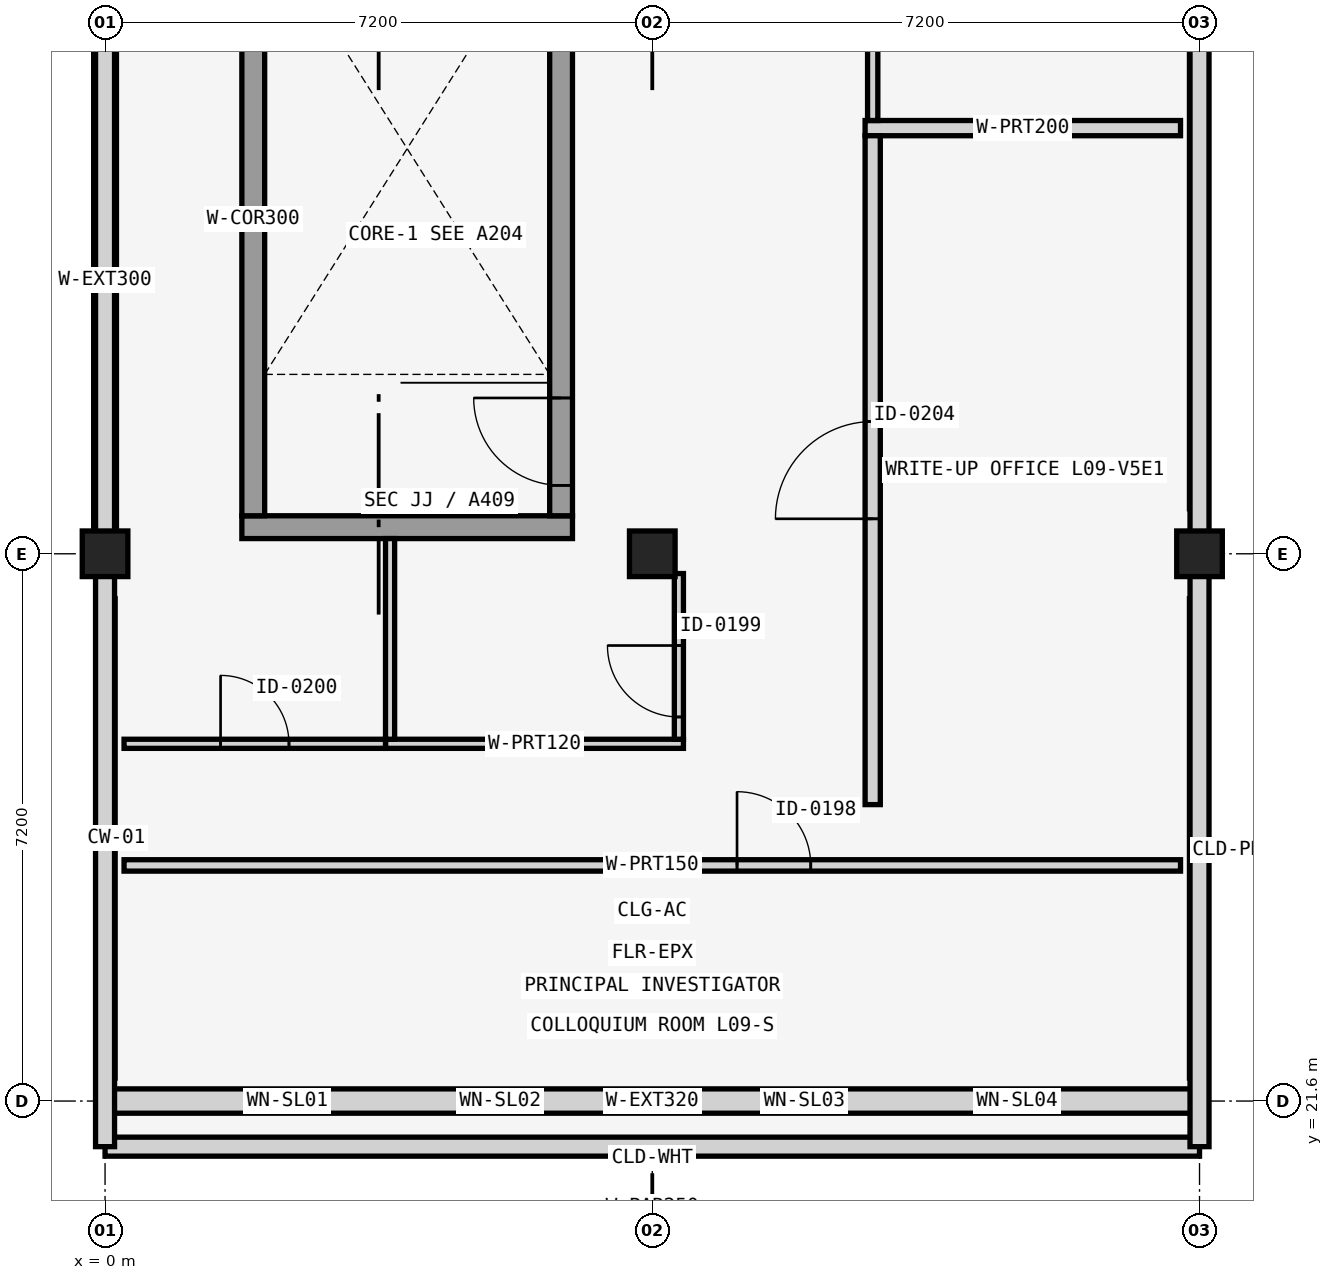
"""IFC4 building model, lengths in metres.
Left out: names, types, materials, properties, quantities, classifications, styles, units other than length and angle.
Written with IfcOpenShell. Run it as: python <this file> out.ifc"""

import sys

from ifc_helpers import new_model, si_unit, direction, frame, frame_2d, origin, origin_2d, place, context, subcontext, project, spatial, rectangle, extrude, element, fill, save


model = new_model("IFC4")
c1 = context("Model", 3, precision=1e-05, world=origin(), true_north=direction((0.0, 1.0)))
c2 = subcontext(c1, "Body", "Model", "MODEL_VIEW")
j1 = project(units=[si_unit("LENGTHUNIT", "METRE"), si_unit("PLANEANGLEUNIT", "RADIAN")], contexts=[c1])
p1 = place(None, origin())
s1 = spatial("IfcSite", under=j1, at=p1, CompositionType="ELEMENT")
p2 = place(p1, origin())
s2 = spatial("IfcBuilding", under=s1, at=p2, CompositionType="ELEMENT")
p3 = place(p2, frame((0.0, 0.0, 38.08)))
s3 = spatial("IfcBuildingStorey", under=s2, at=p3, CompositionType="ELEMENT", Elevation=38.08)
for number, where, z_axis, x_axis in (
    (1, (0.0, 28.8, 0.0), (0.0, 0.0, 1.0), (1.0, 0.0, 0.0)),
    (2, (7.2, 28.8, 0.0), (0.0, 0.0, 1.0), (1.0, 0.0, 0.0)),
    (3, (14.4, 28.8, 0.0), (0.0, 0.0, 1.0), (1.0, 0.0, 0.0)),
):
    element("IfcColumn", number, at=place(p3, frame(where, z_axis=z_axis, x_axis=x_axis)), inside=s3, PredefinedType="COLUMN", context=c2, shape_type="SweptSolid", body=[
        extrude(rectangle(XDim=0.6, YDim=0.6, at=origin_2d()), origin(), (0.0, 0.0, 1.0), 4.16),
    ])
p4 = place(p3, frame((0.0, 21.6, 0.0), z_axis=(0.0, 0.0, 1.0), x_axis=(1.0, 0.0, 0.0)))
e4 = element("IfcWall", 4, at=p4, inside=s3, PredefinedType="SOLIDWALL", context=c2, shape_type="SweptSolid", body=[
    extrude(rectangle(XDim=14.4, YDim=0.32, at=frame_2d((7.2, 0.0))), origin(), (0.0, 0.0, 1.0), 3.28),
])
p5 = place(p4, frame((2.175, 0.0, 0.72)))
e5 = element("IfcOpeningElement", 5, at=p5, cuts=e4, PredefinedType="OPENING", context=c2, shape_type="SweptSolid", body=[
    extrude(rectangle(XDim=0.45, YDim=2.4, at=frame_2d((0.225, 1.2))), frame((0.0, 0.17, 0.0), z_axis=(0.0, -1.0, 0.0), x_axis=(1.0, 0.0, 0.0)), (0.0, 0.0, 1.0), 0.34),
])
p6 = place(p4, frame((4.95, 0.0, 0.72)))
e6 = element("IfcOpeningElement", 6, at=p6, cuts=e4, PredefinedType="OPENING", context=c2, shape_type="SweptSolid", body=[
    extrude(rectangle(XDim=0.5, YDim=2.4, at=frame_2d((0.25, 1.2))), frame((0.0, 0.17, 0.0), z_axis=(0.0, -1.0, 0.0), x_axis=(1.0, 0.0, 0.0)), (0.0, 0.0, 1.0), 0.34),
])
p7 = place(p4, frame((8.925, 0.0, 0.85)))
e7 = element("IfcOpeningElement", 7, at=p7, cuts=e4, PredefinedType="OPENING", context=c2, shape_type="SweptSolid", body=[
    extrude(rectangle(XDim=0.55, YDim=2.2, at=frame_2d((0.275, 1.1))), frame((0.0, 0.17, 0.0), z_axis=(0.0, -1.0, 0.0), x_axis=(1.0, 0.0, 0.0)), (0.0, 0.0, 1.0), 0.34),
])
p8 = place(p4, frame((11.775, 0.0, 0.85)))
e8 = element("IfcOpeningElement", 8, at=p8, cuts=e4, PredefinedType="OPENING", context=c2, shape_type="SweptSolid", body=[
    extrude(rectangle(XDim=0.45, YDim=2.1, at=frame_2d((0.225, 1.05))), frame((0.0, 0.17, 0.0), z_axis=(0.0, -1.0, 0.0), x_axis=(1.0, 0.0, 0.0)), (0.0, 0.0, 1.0), 0.34),
])
p9 = place(p3, frame((0.0, 29.09, 0.0), z_axis=(0.0, 0.0, 1.0), x_axis=(0.0, 1.0, 0.0)))
e9 = element("IfcWall", 9, at=p9, inside=s3, PredefinedType="SOLIDWALL", context=c2, shape_type="SweptSolid", body=[
    extrude(rectangle(XDim=6.62, YDim=0.3, at=frame_2d((3.31, 0.0))), origin(), (0.0, 0.0, 1.0), 3.28),
])
p10 = place(p3, frame((0.0, 21.0, 4.16), z_axis=(0.0, 0.0, 1.0), x_axis=(1.0, 0.0, 0.0)))
e10 = element("IfcWall", 10, at=p10, inside=s3, PredefinedType="PARAPET", context=c2, shape_type="SweptSolid", body=[
    extrude(rectangle(XDim=14.4, YDim=0.25, at=frame_2d((7.2, 0.0))), origin(), (0.0, 0.0, 1.0), 0.9),
])
for number, where, z_axis, x_axis in (
    (11, (0.0, 21.0, 4.16), (0.0, 0.0, 1.0), (0.0, 1.0, 0.0)),
    (12, (14.4, 21.0, 4.16), (0.0, 0.0, 1.0), (0.0, 1.0, 0.0)),
):
    element("IfcWall", number, at=place(p3, frame(where, z_axis=z_axis, x_axis=x_axis)), inside=s3, PredefinedType="PARAPET", context=c2, shape_type="SweptSolid", body=[
        extrude(rectangle(XDim=65.4, YDim=0.25, at=frame_2d((32.7, 0.0))), origin(), (0.0, 0.0, 1.0), 0.9),
    ])
p11 = place(p3, frame((1.8, 29.15, 0.0), z_axis=(0.0, 0.0, 1.0), x_axis=(1.0, 0.0, 0.0)))
e13 = element("IfcWall", 13, at=p11, inside=s3, PredefinedType="SHEAR", context=c2, shape_type="SweptSolid", body=[
    extrude(rectangle(XDim=4.35, YDim=0.3, at=frame_2d((2.175, 0.0))), origin(), (0.0, 0.0, 1.0), 3.88),
])
p12 = place(p3, frame((1.95, 29.3, 0.0), z_axis=(0.0, 0.0, 1.0), x_axis=(0.0, 1.0, 0.0)))
e14 = element("IfcWall", 14, at=p12, inside=s3, PredefinedType="SHEAR", context=c2, shape_type="SweptSolid", body=[
    extrude(rectangle(XDim=7.8, YDim=0.3, at=frame_2d((3.9, 0.0))), origin(), (0.0, 0.0, 1.0), 3.88),
])
p13 = place(p3, frame((6.0, 29.3, 0.0), z_axis=(0.0, 0.0, 1.0), x_axis=(0.0, 1.0, 0.0)))
e15 = element("IfcWall", 15, at=p13, inside=s3, PredefinedType="SHEAR", context=c2, shape_type="SweptSolid", body=[
    extrude(rectangle(XDim=7.8, YDim=0.3, at=frame_2d((3.9, 0.0))), origin(), (0.0, 0.0, 1.0), 3.88),
])
p14 = place(p13, frame((0.4, 0.0, 0.0)))
e16 = element("IfcOpeningElement", 16, at=p14, cuts=e15, PredefinedType="OPENING", context=c2, shape_type="SweptSolid", body=[
    extrude(rectangle(XDim=1.15, YDim=2.2, at=frame_2d((0.575, 1.1))), frame((0.0, 0.16, 0.0), z_axis=(0.0, -1.0, 0.0), x_axis=(1.0, 0.0, 0.0)), (0.0, 0.0, 1.0), 0.32),
])
p15 = place(p3, frame((0.25, 24.7, 0.0), z_axis=(0.0, 0.0, 1.0), x_axis=(1.0, 0.0, 0.0)))
e17 = element("IfcWall", 17, at=p15, inside=s3, PredefinedType="PARTITIONING", context=c2, shape_type="SweptSolid", body=[
    extrude(rectangle(XDim=13.9, YDim=0.15, at=frame_2d((6.95, 0.0))), origin(), (0.0, 0.0, 1.0), 3.28),
])
p16 = place(p15, frame((8.065, 0.0, 0.0)))
e18 = element("IfcOpeningElement", 18, at=p16, cuts=e17, PredefinedType="OPENING", context=c2, shape_type="SweptSolid", body=[
    extrude(rectangle(XDim=0.97, YDim=2.08, at=frame_2d((0.485, 1.04))), frame((0.0, 0.085, 0.0), z_axis=(0.0, -1.0, 0.0), x_axis=(1.0, 0.0, 0.0)), (0.0, 0.0, 1.0), 0.17),
])
p17 = place(p3, frame((3.69, 26.3, 0.0), z_axis=(0.0, 0.0, 1.0), x_axis=(1.0, 0.0, 0.0)))
e19 = element("IfcWall", 19, at=p17, inside=s3, PredefinedType="PARTITIONING", context=c2, shape_type="SweptSolid", body=[
    extrude(rectangle(XDim=3.92, YDim=0.12, at=frame_2d((1.96, 0.0))), origin(), (0.0, 0.0, 1.0), 3.28),
])
p18 = place(p3, frame((3.75, 26.36, 0.0), z_axis=(0.0, 0.0, 1.0), x_axis=(0.0, 1.0, 0.0)))
e20 = element("IfcWall", 20, at=p18, inside=s3, PredefinedType="PARTITIONING", context=c2, shape_type="SweptSolid", body=[
    extrude(rectangle(XDim=2.64, YDim=0.12, at=frame_2d((1.32, 0.0))), origin(), (0.0, 0.0, 1.0), 3.88),
])
p19 = place(p3, frame((7.55, 26.36, 0.0), z_axis=(0.0, 0.0, 1.0), x_axis=(0.0, 1.0, 0.0)))
e21 = element("IfcWall", 21, at=p19, inside=s3, PredefinedType="PARTITIONING", context=c2, shape_type="SweptSolid", body=[
    extrude(rectangle(XDim=2.18, YDim=0.12, at=frame_2d((1.09, 0.0))), origin(), (0.0, 0.0, 1.0), 3.88),
])
p20 = place(p19, frame((0.293, 0.0, 0.0)))
e22 = element("IfcOpeningElement", 22, at=p20, cuts=e21, PredefinedType="OPENING", context=c2, shape_type="SweptSolid", body=[
    extrude(rectangle(XDim=0.94, YDim=2.1, at=frame_2d((0.47, 1.05))), frame((0.0, 0.07, 0.0), z_axis=(0.0, -1.0, 0.0), x_axis=(1.0, 0.0, 0.0)), (0.0, 0.0, 1.0), 0.14),
])
p21 = place(p3, frame((0.25, 26.3, 0.0), z_axis=(0.0, 0.0, 1.0), x_axis=(1.0, 0.0, 0.0)))
e23 = element("IfcWall", 23, at=p21, inside=s3, PredefinedType="PARTITIONING", context=c2, shape_type="SweptSolid", body=[
    extrude(rectangle(XDim=3.44, YDim=0.12, at=frame_2d((1.72, 0.0))), origin(), (0.0, 0.0, 1.0), 3.88),
])
p22 = place(p21, frame((1.27, 0.0, 0.0)))
e24 = element("IfcOpeningElement", 24, at=p22, cuts=e23, PredefinedType="OPENING", context=c2, shape_type="SweptSolid", body=[
    extrude(rectangle(XDim=0.9, YDim=2.1, at=frame_2d((0.45, 1.05))), frame((0.0, 0.07, 0.0), z_axis=(0.0, -1.0, 0.0), x_axis=(1.0, 0.0, 0.0)), (0.0, 0.0, 1.0), 0.14),
])
p23 = place(p3, frame((10.0, 34.4, 0.0), z_axis=(0.0, 0.0, 1.0), x_axis=(1.0, 0.0, 0.0)))
e25 = element("IfcWall", 25, at=p23, inside=s3, PredefinedType="PARTITIONING", context=c2, shape_type="SweptSolid", body=[
    extrude(rectangle(XDim=4.15, YDim=0.2, at=frame_2d((2.075, 0.0))), origin(), (0.0, 0.0, 1.0), 3.88),
])
p24 = place(p3, frame((10.1, 25.5, 0.0), z_axis=(0.0, 0.0, 1.0), x_axis=(0.0, 1.0, 0.0)))
e26 = element("IfcWall", 26, at=p24, inside=s3, PredefinedType="PARTITIONING", context=c2, shape_type="SweptSolid", body=[
    extrude(rectangle(XDim=8.8, YDim=0.2, at=frame_2d((4.4, 0.0))), origin(), (0.0, 0.0, 1.0), 3.88),
])
p25 = place(p24, frame((3.76, 0.0, 0.0)))
e27 = element("IfcOpeningElement", 27, at=p25, cuts=e26, PredefinedType="OPENING", context=c2, shape_type="SweptSolid", body=[
    extrude(rectangle(XDim=1.28, YDim=2.12, at=frame_2d((0.64, 1.06))), frame((0.0, 0.11, 0.0), z_axis=(0.0, -1.0, 0.0), x_axis=(1.0, 0.0, 0.0)), (0.0, 0.0, 1.0), 0.22),
])
p26 = place(p3, frame((10.1, 34.5, 0.0), z_axis=(0.0, 0.0, 1.0), x_axis=(0.0, 1.0, 0.0)))
e28 = element("IfcWall", 28, at=p26, inside=s3, PredefinedType="PARTITIONING", context=c2, shape_type="SweptSolid", body=[
    extrude(rectangle(XDim=14.232, YDim=0.135, at=frame_2d((7.116, 0.0))), origin(), (0.0, 0.0, 1.0), 3.88),
])
p27 = place(p26, frame((6.451, 0.0, 0.0)))
e29 = element("IfcOpeningElement", 29, at=p27, cuts=e28, PredefinedType="OPENING", context=c2, shape_type="SweptSolid", body=[
    extrude(rectangle(XDim=1.33, YDim=2.12, at=frame_2d((0.665, 1.06))), frame((0.0, 0.078, 0.0), z_axis=(0.0, -1.0, 0.0), x_axis=(1.0, 0.0, 0.0)), (0.0, 0.0, 1.0), 0.155),
])
p28 = place(p5, origin())
e30 = element("IfcWindow", 30, at=p28, inside=s3, PartitioningType="SINGLE_PANEL", PredefinedType="WINDOW", context=c2, shape_type="SweptSolid", body=[
    extrude(rectangle(XDim=0.45, YDim=2.4, at=frame_2d((0.225, 1.2))), frame((0.0, 0.03, 0.0), z_axis=(0.0, -1.0, 0.0), x_axis=(1.0, 0.0, 0.0)), (0.0, 0.0, 1.0), 0.06),
])
fill(e5, e30)
p29 = place(p6, origin())
e31 = element("IfcWindow", 31, at=p29, inside=s3, PartitioningType="SINGLE_PANEL", PredefinedType="WINDOW", context=c2, shape_type="SweptSolid", body=[
    extrude(rectangle(XDim=0.5, YDim=2.4, at=frame_2d((0.25, 1.2))), frame((0.0, 0.03, 0.0), z_axis=(0.0, -1.0, 0.0), x_axis=(1.0, 0.0, 0.0)), (0.0, 0.0, 1.0), 0.06),
])
fill(e6, e31)
p30 = place(p7, origin())
e32 = element("IfcWindow", 32, at=p30, inside=s3, PartitioningType="SINGLE_PANEL", PredefinedType="WINDOW", context=c2, shape_type="SweptSolid", body=[
    extrude(rectangle(XDim=0.55, YDim=2.2, at=frame_2d((0.275, 1.1))), frame((0.0, 0.03, 0.0), z_axis=(0.0, -1.0, 0.0), x_axis=(1.0, 0.0, 0.0)), (0.0, 0.0, 1.0), 0.06),
])
fill(e7, e32)
p31 = place(p8, origin())
e33 = element("IfcWindow", 33, at=p31, inside=s3, PartitioningType="SINGLE_PANEL", PredefinedType="WINDOW", context=c2, shape_type="SweptSolid", body=[
    extrude(rectangle(XDim=0.45, YDim=2.1, at=frame_2d((0.225, 1.05))), frame((0.0, 0.03, 0.0), z_axis=(0.0, -1.0, 0.0), x_axis=(1.0, 0.0, 0.0)), (0.0, 0.0, 1.0), 0.06),
])
fill(e8, e33)
p32 = place(p14, origin())
e34 = element("IfcDoor", 34, at=p32, inside=s3, OperationType="SINGLE_SWING_RIGHT", PredefinedType="DOOR", context=c2, shape_type="SweptSolid", body=[
    extrude(rectangle(XDim=1.15, YDim=2.2, at=frame_2d((0.575, 1.1))), frame((0.0, 0.025, 0.0), z_axis=(0.0, -1.0, 0.0), x_axis=(1.0, 0.0, 0.0)), (0.0, 0.0, 1.0), 0.05),
])
fill(e16, e34)
p33 = place(p16, origin())
e35 = element("IfcDoor", 35, at=p33, inside=s3, OperationType="SINGLE_SWING_LEFT", PredefinedType="DOOR", context=c2, shape_type="SweptSolid", body=[
    extrude(rectangle(XDim=0.97, YDim=2.08, at=frame_2d((0.485, 1.04))), frame((0.0, 0.025, 0.0), z_axis=(0.0, -1.0, 0.0), x_axis=(1.0, 0.0, 0.0)), (0.0, 0.0, 1.0), 0.05),
])
fill(e18, e35)
p34 = place(p20, frame((0.94, 0.0, 0.0), z_axis=(0.0, 0.0, 1.0), x_axis=(-1.0, 0.0, 0.0)))
e36 = element("IfcDoor", 36, at=p34, inside=s3, OperationType="SINGLE_SWING_RIGHT", PredefinedType="DOOR", context=c2, shape_type="SweptSolid", body=[
    extrude(rectangle(XDim=0.94, YDim=2.1, at=frame_2d((0.47, 1.05))), frame((0.0, 0.025, 0.0), z_axis=(0.0, -1.0, 0.0), x_axis=(1.0, 0.0, 0.0)), (0.0, 0.0, 1.0), 0.05),
])
fill(e22, e36)
p35 = place(p22, origin())
e37 = element("IfcDoor", 37, at=p35, inside=s3, OperationType="SINGLE_SWING_LEFT", PredefinedType="DOOR", context=c2, shape_type="SweptSolid", body=[
    extrude(rectangle(XDim=0.9, YDim=2.1, at=frame_2d((0.45, 1.05))), frame((0.0, 0.025, 0.0), z_axis=(0.0, -1.0, 0.0), x_axis=(1.0, 0.0, 0.0)), (0.0, 0.0, 1.0), 0.05),
])
fill(e24, e37)
p36 = place(p25, origin())
e38 = element("IfcDoor", 38, at=p36, inside=s3, OperationType="SINGLE_SWING_LEFT", PredefinedType="DOOR", context=c2, shape_type="SweptSolid", body=[
    extrude(rectangle(XDim=1.28, YDim=2.12, at=frame_2d((0.64, 1.06))), frame((0.0, 0.025, 0.0), z_axis=(0.0, -1.0, 0.0), x_axis=(1.0, 0.0, 0.0)), (0.0, 0.0, 1.0), 0.05),
])
fill(e27, e38)
save(model, sys.argv[1])
